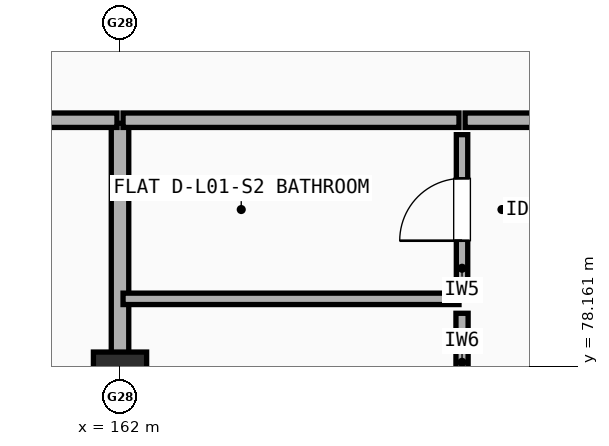
"""IFC4 building model, lengths in metres.
Left out: names, types, materials, properties, quantities, classifications, styles, units other than length and angle.
Written with IfcOpenShell. Run it as: python <this file> out.ifc"""

import sys

from ifc_helpers import new_model, si_unit, direction, frame, frame_2d, origin, origin_2d, place, context, subcontext, project, spatial, rectangle, extrude, element, fill, save


model = new_model("IFC4")
c1 = context("Model", 3, precision=1e-05, world=origin(), true_north=direction((0.0, 1.0)))
c2 = subcontext(c1, "Body", "Model", "MODEL_VIEW")
j1 = project(units=[si_unit("LENGTHUNIT", "METRE"), si_unit("PLANEANGLEUNIT", "RADIAN")], contexts=[c1])
p1 = place(None, origin())
s1 = spatial("IfcSite", under=j1, at=p1, CompositionType="ELEMENT")
p2 = place(p1, origin())
s2 = spatial("IfcBuilding", under=s1, at=p2, CompositionType="ELEMENT")
p3 = place(p2, frame((0.0, 0.0, 4.5)))
s3 = spatial("IfcBuildingStorey", under=s2, at=p3, CompositionType="ELEMENT", Elevation=4.5)
p4 = place(p3, frame((162.0, 78.0, 0.0), z_axis=(0.0, 0.0, 1.0), x_axis=(1.0, 0.0, 0.0)))
e1 = element("IfcColumn", 1, at=p4, inside=s3, PredefinedType="COLUMN", context=c2, shape_type="SweptSolid", body=[
    extrude(rectangle(XDim=0.7, YDim=0.7, at=origin_2d()), origin(), (0.0, 0.0, 1.0), 2.945),
])
p5 = place(p3, frame((162.0, 72.39, 0.0), z_axis=(0.0, 0.0, 1.0), x_axis=(0.0, 1.0, 0.0)))
e2 = element("IfcWall", 2, at=p5, inside=s3, PredefinedType="SOLIDWALL", context=c2, shape_type="SweptSolid", body=[
    extrude(rectangle(XDim=8.97, YDim=0.23, at=frame_2d((4.485, 0.0))), origin(), (0.0, 0.0, 1.0), 2.945),
])
p6 = place(p3, frame((159.04, 81.4, 0.0), z_axis=(0.0, 0.0, 1.0), x_axis=(1.0, 0.0, 0.0)))
e3 = element("IfcWall", 3, at=p6, inside=s3, PredefinedType="SOLIDWALL", context=c2, shape_type="SweptSolid", body=[
    extrude(rectangle(XDim=2.92, YDim=0.19, at=frame_2d((1.46, 0.0))), origin(), (0.0, 0.0, 1.0), 2.945),
])
p7 = place(p3, frame((162.04, 81.4, 0.0), z_axis=(0.0, 0.0, 1.0), x_axis=(1.0, 0.0, 0.0)))
e4 = element("IfcWall", 4, at=p7, inside=s3, PredefinedType="SOLIDWALL", context=c2, shape_type="SweptSolid", body=[
    extrude(rectangle(XDim=4.42, YDim=0.19, at=frame_2d((2.21, 0.0))), origin(), (0.0, 0.0, 1.0), 2.945),
])
p8 = place(p3, frame((166.54, 81.4, 0.0), z_axis=(0.0, 0.0, 1.0), x_axis=(1.0, 0.0, 0.0)))
e5 = element("IfcWall", 5, at=p8, inside=s3, PredefinedType="SOLIDWALL", context=c2, shape_type="SweptSolid", body=[
    extrude(rectangle(XDim=4.42, YDim=0.19, at=frame_2d((2.21, 0.0))), origin(), (0.0, 0.0, 1.0), 2.945),
])
p9 = place(p8, frame((1.71, 0.0, 0.0)))
e6 = element("IfcOpeningElement", 6, at=p9, cuts=e5, PredefinedType="OPENING", context=c2, shape_type="SweptSolid", body=[
    extrude(rectangle(XDim=1.0, YDim=2.15, at=frame_2d((0.5, 1.075))), frame((0.0, 0.105, 0.0), z_axis=(0.0, -1.0, 0.0), x_axis=(1.0, 0.0, 0.0)), (0.0, 0.0, 1.0), 0.21),
])
p10 = place(p3, frame((166.5, 76.39, 0.0), z_axis=(0.0, 0.0, 1.0), x_axis=(0.0, 1.0, 0.0)))
e7 = element("IfcWall", 7, at=p10, inside=s3, PredefinedType="PLUMBINGWALL", context=c2, shape_type="SweptSolid", body=[
    extrude(rectangle(XDim=2.47, YDim=0.16, at=frame_2d((1.235, 0.0))), origin(), (0.0, 0.0, 1.0), 2.688),
])
p11 = place(p10, frame((0.13, 0.0, 0.0)))
e8 = element("IfcOpeningElement", 8, at=p11, cuts=e7, PredefinedType="OPENING", context=c2, shape_type="SweptSolid", body=[
    extrude(rectangle(XDim=0.9, YDim=2.1, at=frame_2d((0.45, 1.05))), frame((0.0, 0.09, 0.0), z_axis=(0.0, -1.0, 0.0), x_axis=(1.0, 0.0, 0.0)), (0.0, 0.0, 1.0), 0.18),
])
p12 = place(p3, frame((166.5, 79.24, 0.0), z_axis=(0.0, 0.0, 1.0), x_axis=(0.0, 1.0, 0.0)))
e9 = element("IfcWall", 9, at=p12, inside=s3, PredefinedType="PARTITIONING", context=c2, shape_type="SweptSolid", body=[
    extrude(rectangle(XDim=1.97, YDim=0.15, at=frame_2d((0.985, 0.0))), origin(), (0.0, 0.0, 1.0), 2.945),
])
p13 = place(p12, frame((0.575, 0.0, 0.0)))
e10 = element("IfcOpeningElement", 10, at=p13, cuts=e9, PredefinedType="OPENING", context=c2, shape_type="SweptSolid", body=[
    extrude(rectangle(XDim=0.82, YDim=2.08, at=frame_2d((0.41, 1.04))), frame((0.0, 0.085, 0.0), z_axis=(0.0, -1.0, 0.0), x_axis=(1.0, 0.0, 0.0)), (0.0, 0.0, 1.0), 0.17),
])
p14 = place(p3, frame((162.04, 79.05, 0.0), z_axis=(0.0, 0.0, 1.0), x_axis=(1.0, 0.0, 0.0)))
e11 = element("IfcWall", 11, at=p14, inside=s3, PredefinedType="PARTITIONING", context=c2, shape_type="SweptSolid", body=[
    extrude(rectangle(XDim=4.42, YDim=0.15, at=frame_2d((2.21, 0.0))), origin(), (0.0, 0.0, 1.0), 2.945),
])
p15 = place(p13, origin())
e12 = element("IfcDoor", 12, at=p15, inside=s3, OperationType="SINGLE_SWING_LEFT", PredefinedType="DOOR", context=c2, shape_type="SweptSolid", body=[
    extrude(rectangle(XDim=0.82, YDim=2.08, at=frame_2d((0.41, 1.04))), frame((0.0, 0.025, 0.0), z_axis=(0.0, -1.0, 0.0), x_axis=(1.0, 0.0, 0.0)), (0.0, 0.0, 1.0), 0.05),
])
fill(e10, e12)
save(model, sys.argv[1])
